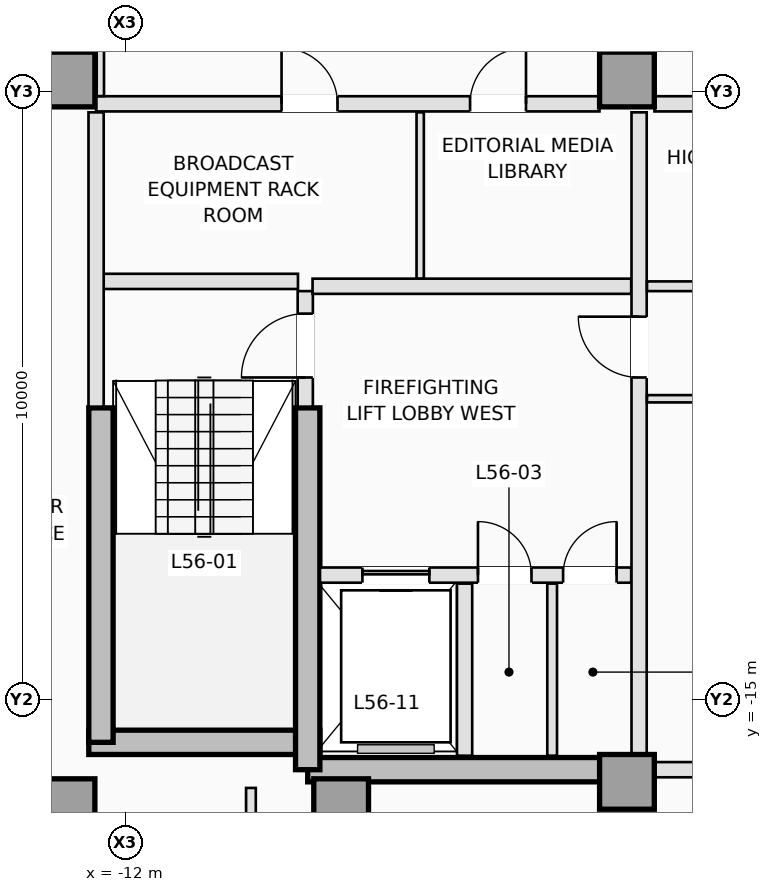
"""IFC4 building model, lengths in metres.
Left out: names, types, materials, properties, quantities, classifications, styles, units other than length and angle.
Written with IfcOpenShell. Run it as: python <this file> out.ifc"""

import sys

from ifc_helpers import new_model, si_unit, direction, frame, frame_2d, origin, origin_2d, place, context, subcontext, project, spatial, rectangle, extrude, element, fill, save


model = new_model("IFC4")
c1 = context("Model", 3, precision=1e-05, world=origin(), true_north=direction((0.0, 1.0)))
c2 = subcontext(c1, "Body", "Model", "MODEL_VIEW")
j1 = project(units=[si_unit("LENGTHUNIT", "METRE"), si_unit("PLANEANGLEUNIT", "RADIAN")], contexts=[c1])
p1 = place(None, origin())
s1 = spatial("IfcSite", under=j1, at=p1, CompositionType="ELEMENT")
p2 = place(p1, origin())
s2 = spatial("IfcBuilding", under=s1, at=p2, CompositionType="ELEMENT")
p3 = place(p2, frame((0.0, 0.0, 204.4)))
s3 = spatial("IfcBuildingStorey", under=s2, at=p3, CompositionType="ELEMENT", Elevation=204.4)
p4 = place(p3, frame((-12.6, -15.7, 0.0), z_axis=(0.0, 0.0, 1.0), x_axis=(1.0, 0.0, 0.0)))
e1 = element("IfcWall", 1, at=p4, inside=s3, PredefinedType="SHEAR", context=c2, shape_type="SweptSolid", body=[
    extrude(rectangle(XDim=3.8, YDim=0.4, at=frame_2d((1.9, 0.0))), origin(), (0.0, 0.0, 1.0), 3.5),
])
p5 = place(p3, frame((-9.0, -16.15, 0.0), z_axis=(0.0, 0.0, 1.0), x_axis=(1.0, 0.0, 0.0)))
e2 = element("IfcWall", 2, at=p5, inside=s3, PredefinedType="SHEAR", context=c2, shape_type="SweptSolid", body=[
    extrude(rectangle(XDim=5.25, YDim=0.4, at=frame_2d((2.625, 0.0))), origin(), (0.0, 0.0, 1.0), 3.5),
])
p6 = place(p3, frame((-12.4, -15.7, 0.0), z_axis=(0.0, 0.0, 1.0), x_axis=(0.0, 1.0, 0.0)))
e3 = element("IfcWall", 3, at=p6, inside=s3, PredefinedType="SHEAR", context=c2, shape_type="SweptSolid", body=[
    extrude(rectangle(XDim=5.5, YDim=0.4, at=frame_2d((2.75, 0.0))), origin(), (0.0, 0.0, 1.0), 3.5),
])
p7 = place(p3, frame((-9.0, -16.15, 0.0), z_axis=(0.0, 0.0, 1.0), x_axis=(0.0, 1.0, 0.0)))
e4 = element("IfcWall", 4, at=p7, inside=s3, PredefinedType="SHEAR", context=c2, shape_type="SweptSolid", body=[
    extrude(rectangle(XDim=5.95, YDim=0.4, at=frame_2d((2.975, 0.0))), origin(), (0.0, 0.0, 1.0), 3.5),
])
for number, where, z_axis, x_axis in (
    (5, (-12.95, -16.75, 0.0), (0.0, 0.0, 1.0), (1.0, 0.0, 0.0)),
    (6, (-8.45, -16.75, 0.0), (0.0, 0.0, 1.0), (1.0, 0.0, 0.0)),
    (7, (-3.75, -16.35, 0.0), (0.0, 0.0, 1.0), (1.0, 0.0, 0.0)),
    (8, (-12.95, -4.8, 0.0), (0.0, 0.0, 1.0), (1.0, 0.0, 0.0)),
    (9, (-3.75, -4.8, 0.0), (0.0, 0.0, 1.0), (1.0, 0.0, 0.0)),
):
    element("IfcColumn", number, at=place(p3, frame(where, z_axis=z_axis, x_axis=x_axis)), inside=s3, PredefinedType="COLUMN", context=c2, shape_type="SweptSolid", body=[
        extrude(rectangle(XDim=0.9, YDim=0.9, at=origin_2d()), origin(), (0.0, 0.0, 1.0), 3.5),
    ])
p8 = place(p3, frame((-9.04, -10.18, 0.0), z_axis=(0.0, 0.0, 1.0), x_axis=(0.0, 1.0, 0.0)))
e10 = element("IfcWall", 10, at=p8, inside=s3, PredefinedType="PARTITIONING", context=c2, shape_type="SweptSolid", body=[
    extrude(rectangle(XDim=1.9, YDim=0.25, at=frame_2d((0.95, 0.0))), origin(), (0.0, 0.0, 1.0), 3.25),
])
p9 = place(p8, frame((0.48, 0.0, 0.0)))
e11 = element("IfcOpeningElement", 11, at=p9, cuts=e10, PredefinedType="OPENING", context=c2, shape_type="SweptSolid", body=[
    extrude(rectangle(XDim=1.05, YDim=2.15, at=frame_2d((0.525, 1.075))), frame((0.0, 0.135, 0.0), z_axis=(0.0, -1.0, 0.0), x_axis=(1.0, 0.0, 0.0)), (0.0, 0.0, 1.0), 0.27),
])
p10 = place(p3, frame((-12.38, -8.12, 0.0), z_axis=(0.0, 0.0, 1.0), x_axis=(1.0, 0.0, 0.0)))
e12 = element("IfcWall", 12, at=p10, inside=s3, PredefinedType="PARTITIONING", context=c2, shape_type="SweptSolid", body=[
    extrude(rectangle(XDim=3.22, YDim=0.25, at=frame_2d((1.61, 0.0))), origin(), (0.0, 0.0, 1.0), 3.25),
])
p11 = place(p3, frame((-12.48, -10.18, 0.0), z_axis=(0.0, 0.0, 1.0), x_axis=(0.0, 1.0, 0.0)))
e13 = element("IfcWall", 13, at=p11, inside=s3, PredefinedType="PARTITIONING", context=c2, shape_type="SweptSolid", body=[
    extrude(rectangle(XDim=4.84, YDim=0.25, at=frame_2d((2.42, 0.0))), origin(), (0.0, 0.0, 1.0), 3.25),
])
p12 = place(p3, frame((-8.798, -12.95, 0.0), z_axis=(0.0, 0.0, 1.0), x_axis=(1.0, 0.0, 0.0)))
e14 = element("IfcWall", 14, at=p12, inside=s3, PredefinedType="PARTITIONING", context=c2, shape_type="SweptSolid", body=[
    extrude(rectangle(XDim=5.118, YDim=0.25, at=frame_2d((2.559, 0.0))), origin(), (0.0, 0.0, 1.0), 3.25),
])
p13 = place(p12, frame((0.698, 0.0, 0.0)))
e15 = element("IfcOpeningElement", 15, at=p13, cuts=e14, PredefinedType="OPENING", context=c2, shape_type="SweptSolid", body=[
    extrude(rectangle(XDim=1.1, YDim=2.15, at=frame_2d((0.55, 1.075))), frame((0.0, 0.135, 0.0), z_axis=(0.0, -1.0, 0.0), x_axis=(1.0, 0.0, 0.0)), (0.0, 0.0, 1.0), 0.27),
])
p14 = place(p12, frame((2.598, 0.0, 0.0)))
e16 = element("IfcOpeningElement", 16, at=p14, cuts=e14, PredefinedType="OPENING", context=c2, shape_type="SweptSolid", body=[
    extrude(rectangle(XDim=0.88, YDim=2.1, at=frame_2d((0.44, 1.05))), frame((0.0, 0.135, 0.0), z_axis=(0.0, -1.0, 0.0), x_axis=(1.0, 0.0, 0.0)), (0.0, 0.0, 1.0), 0.27),
])
p15 = place(p12, frame((3.998, 0.0, 0.0)))
e17 = element("IfcOpeningElement", 17, at=p15, cuts=e14, PredefinedType="OPENING", context=c2, shape_type="SweptSolid", body=[
    extrude(rectangle(XDim=0.88, YDim=2.1, at=frame_2d((0.44, 1.05))), frame((0.0, 0.135, 0.0), z_axis=(0.0, -1.0, 0.0), x_axis=(1.0, 0.0, 0.0)), (0.0, 0.0, 1.0), 0.27),
])
p16 = place(p3, frame((-6.42, -15.92, 0.0), z_axis=(0.0, 0.0, 1.0), x_axis=(0.0, 1.0, 0.0)))
e18 = element("IfcWall", 18, at=p16, inside=s3, PredefinedType="PARTITIONING", context=c2, shape_type="SweptSolid", body=[
    extrude(rectangle(XDim=2.83, YDim=0.25, at=frame_2d((1.415, 0.0))), origin(), (0.0, 0.0, 1.0), 3.25),
])
p17 = place(p3, frame((-4.98, -15.92, 0.0), z_axis=(0.0, 0.0, 1.0), x_axis=(0.0, 1.0, 0.0)))
e19 = element("IfcWall", 19, at=p17, inside=s3, PredefinedType="PARTITIONING", context=c2, shape_type="SweptSolid", body=[
    extrude(rectangle(XDim=2.83, YDim=0.16, at=frame_2d((1.415, 0.0))), origin(), (0.0, 0.0, 1.0), 3.25),
])
p18 = place(p3, frame((-8.92, -8.2, 0.0), z_axis=(0.0, 0.0, 1.0), x_axis=(1.0, 0.0, 0.0)))
e20 = element("IfcWall", 20, at=p18, inside=s3, PredefinedType="PARTITIONING", context=c2, shape_type="SweptSolid", body=[
    extrude(rectangle(XDim=5.24, YDim=0.25, at=frame_2d((2.62, 0.0))), origin(), (0.0, 0.0, 1.0), 3.25),
])
p19 = place(p3, frame((-3.55, -15.898, 0.0), z_axis=(0.0, 0.0, 1.0), x_axis=(0.0, 1.0, 0.0)))
e21 = element("IfcWall", 21, at=p19, inside=s3, PredefinedType="PARTITIONING", context=c2, shape_type="SweptSolid", body=[
    extrude(rectangle(XDim=10.558, YDim=0.25, at=frame_2d((5.279, 0.0))), origin(), (0.0, 0.0, 1.0), 3.25),
])
p20 = place(p19, frame((6.198, 0.0, 0.0)))
e22 = element("IfcOpeningElement", 22, at=p20, cuts=e21, PredefinedType="OPENING", context=c2, shape_type="SweptSolid", body=[
    extrude(rectangle(XDim=1.0, YDim=2.15, at=frame_2d((0.5, 1.075))), frame((0.0, 0.135, 0.0), z_axis=(0.0, -1.0, 0.0), x_axis=(1.0, 0.0, 0.0)), (0.0, 0.0, 1.0), 0.27),
])
p21 = place(p3, frame((-12.48, -5.2, 0.0), z_axis=(0.0, 0.0, 1.0), x_axis=(1.0, 0.0, 0.0)))
e23 = element("IfcWall", 23, at=p21, inside=s3, PredefinedType="PARTITIONING", context=c2, shape_type="SweptSolid", body=[
    extrude(rectangle(XDim=8.278, YDim=0.25, at=frame_2d((4.139, 0.0))), origin(), (0.0, 0.0, 1.0), 3.25),
])
p22 = place(p21, frame((3.05, 0.0, 0.0)))
e24 = element("IfcOpeningElement", 24, at=p22, cuts=e23, PredefinedType="OPENING", context=c2, shape_type="SweptSolid", body=[
    extrude(rectangle(XDim=0.92, YDim=2.12, at=frame_2d((0.46, 1.06))), frame((0.0, 0.135, 0.0), z_axis=(0.0, -1.0, 0.0), x_axis=(1.0, 0.0, 0.0)), (0.0, 0.0, 1.0), 0.27),
])
p23 = place(p21, frame((6.15, 0.0, 0.0)))
e25 = element("IfcOpeningElement", 25, at=p23, cuts=e23, PredefinedType="OPENING", context=c2, shape_type="SweptSolid", body=[
    extrude(rectangle(XDim=0.92, YDim=2.12, at=frame_2d((0.46, 1.06))), frame((0.0, 0.135, 0.0), z_axis=(0.0, -1.0, 0.0), x_axis=(1.0, 0.0, 0.0)), (0.0, 0.0, 1.0), 0.27),
])
p24 = place(p3, frame((-3.298, -5.2, 0.0), z_axis=(0.0, 0.0, 1.0), x_axis=(1.0, 0.0, 0.0)))
e26 = element("IfcWall", 26, at=p24, inside=s3, PredefinedType="PARTITIONING", context=c2, shape_type="SweptSolid", body=[
    extrude(rectangle(XDim=2.348, YDim=0.25, at=frame_2d((1.174, 0.0))), origin(), (0.0, 0.0, 1.0), 3.25),
])
p25 = place(p3, frame((-7.15, -8.073, 0.0), z_axis=(0.0, 0.0, 1.0), x_axis=(0.0, 1.0, 0.0)))
e27 = element("IfcWall", 27, at=p25, inside=s3, PredefinedType="PARTITIONING", context=c2, shape_type="SweptSolid", body=[
    extrude(rectangle(XDim=2.733, YDim=0.12, at=frame_2d((1.366, 0.0))), origin(), (0.0, 0.0, 1.0), 3.25),
])
p26 = place(p3, frame((-3.298, -16.15, 0.0), z_axis=(0.0, 0.0, 1.0), x_axis=(1.0, 0.0, 0.0)))
e28 = element("IfcWall", 28, at=p26, inside=s3, PredefinedType="PARTITIONING", context=c2, shape_type="SweptSolid", body=[
    extrude(rectangle(XDim=6.596, YDim=0.25, at=frame_2d((3.298, 0.0))), origin(), (0.0, 0.0, 1.0), 2.45),
])
p27 = place(p3, frame((-3.42, -8.2, 0.0), z_axis=(0.0, 0.0, 1.0), x_axis=(1.0, 0.0, 0.0)))
e29 = element("IfcWall", 29, at=p27, inside=s3, PredefinedType="PARTITIONING", context=c2, shape_type="SweptSolid", body=[
    extrude(rectangle(XDim=6.84, YDim=0.16, at=frame_2d((3.42, 0.0))), origin(), (0.0, 0.0, 1.0), 3.25),
])
p28 = place(p27, frame((2.92, 0.0, 0.0)))
e30 = element("IfcOpeningElement", 30, at=p28, cuts=e29, PredefinedType="OPENING", context=c2, shape_type="SweptSolid", body=[
    extrude(rectangle(XDim=1.0, YDim=2.15, at=frame_2d((0.5, 1.075))), frame((0.0, 0.09, 0.0), z_axis=(0.0, -1.0, 0.0), x_axis=(1.0, 0.0, 0.0)), (0.0, 0.0, 1.0), 0.18),
])
p29 = place(p3, frame((-3.42, -10.05, 0.0), z_axis=(0.0, 0.0, 1.0), x_axis=(1.0, 0.0, 0.0)))
e31 = element("IfcWall", 31, at=p29, inside=s3, PredefinedType="PARTITIONING", context=c2, shape_type="SweptSolid", body=[
    extrude(rectangle(XDim=6.84, YDim=0.12, at=frame_2d((3.42, 0.0))), origin(), (0.0, 0.0, 1.0), 3.25),
])
p30 = place(p29, frame((2.95, 0.0, 0.0)))
e32 = element("IfcOpeningElement", 32, at=p30, cuts=e31, PredefinedType="OPENING", context=c2, shape_type="SweptSolid", body=[
    extrude(rectangle(XDim=0.92, YDim=2.12, at=frame_2d((0.46, 1.06))), frame((0.0, 0.07, 0.0), z_axis=(0.0, -1.0, 0.0), x_axis=(1.0, 0.0, 0.0)), (0.0, 0.0, 1.0), 0.14),
])
p31 = place(p3, frame((-12.41, -5.073, 0.0), z_axis=(0.0, 0.0, 1.0), x_axis=(0.0, 1.0, 0.0)))
e33 = element("IfcWall", 33, at=p31, inside=s3, PredefinedType="PARTITIONING", context=c2, shape_type="SweptSolid", body=[
    extrude(rectangle(XDim=2.673, YDim=0.12, at=frame_2d((1.336, 0.0))), origin(), (0.0, 0.0, 1.0), 3.25),
])
p32 = place(p31, frame((0.828, 0.0, 0.0)))
e34 = element("IfcOpeningElement", 34, at=p32, cuts=e33, PredefinedType="OPENING", context=c2, shape_type="SweptSolid", body=[
    extrude(rectangle(XDim=0.92, YDim=2.12, at=frame_2d((0.46, 1.06))), frame((0.0, 0.07, 0.0), z_axis=(0.0, -1.0, 0.0), x_axis=(1.0, 0.0, 0.0)), (0.0, 0.0, 1.0), 0.14),
])
p33 = place(p3, frame((-9.934, -16.45, 0.0), z_axis=(0.0, 0.0, 1.0), x_axis=(0.0, -1.0, 0.0)))
e35 = element("IfcWall", 35, at=p33, inside=s3, PredefinedType="PARTITIONING", context=c2, shape_type="SweptSolid", body=[
    extrude(rectangle(XDim=1.193, YDim=0.16, at=frame_2d((0.597, 0.0))), origin(), (0.0, 0.0, 1.0), 3.25),
])
p34 = place(p13, origin())
e36 = element("IfcDoor", 36, at=p34, inside=s3, OperationType="SLIDING_TO_LEFT", PredefinedType="DOOR", context=c2, shape_type="SweptSolid", body=[
    extrude(rectangle(XDim=1.1, YDim=2.15, at=frame_2d((0.55, 1.075))), frame((0.0, 0.025, 0.0), z_axis=(0.0, -1.0, 0.0), x_axis=(1.0, 0.0, 0.0)), (0.0, 0.0, 1.0), 0.05),
])
fill(e15, e36)
p35 = place(p9, origin())
e37 = element("IfcDoor", 37, at=p35, inside=s3, OperationType="SINGLE_SWING_LEFT", PredefinedType="DOOR", context=c2, shape_type="SweptSolid", body=[
    extrude(rectangle(XDim=1.05, YDim=2.15, at=frame_2d((0.525, 1.075))), frame((0.0, 0.025, 0.0), z_axis=(0.0, -1.0, 0.0), x_axis=(1.0, 0.0, 0.0)), (0.0, 0.0, 1.0), 0.05),
])
fill(e11, e37)
p36 = place(p14, origin())
e38 = element("IfcDoor", 38, at=p36, inside=s3, OperationType="SINGLE_SWING_LEFT", PredefinedType="TRAPDOOR", context=c2, shape_type="SweptSolid", body=[
    extrude(rectangle(XDim=0.88, YDim=2.1, at=frame_2d((0.44, 1.05))), frame((0.0, 0.025, 0.0), z_axis=(0.0, -1.0, 0.0), x_axis=(1.0, 0.0, 0.0)), (0.0, 0.0, 1.0), 0.05),
])
fill(e16, e38)
p37 = place(p15, origin())
e39 = element("IfcDoor", 39, at=p37, inside=s3, OperationType="SINGLE_SWING_RIGHT", PredefinedType="TRAPDOOR", context=c2, shape_type="SweptSolid", body=[
    extrude(rectangle(XDim=0.88, YDim=2.1, at=frame_2d((0.44, 1.05))), frame((0.0, 0.025, 0.0), z_axis=(0.0, -1.0, 0.0), x_axis=(1.0, 0.0, 0.0)), (0.0, 0.0, 1.0), 0.05),
])
fill(e17, e39)
p38 = place(p20, origin())
e40 = element("IfcDoor", 40, at=p38, inside=s3, OperationType="SINGLE_SWING_RIGHT", PredefinedType="DOOR", context=c2, shape_type="SweptSolid", body=[
    extrude(rectangle(XDim=1.0, YDim=2.15, at=frame_2d((0.5, 1.075))), frame((0.0, 0.025, 0.0), z_axis=(0.0, -1.0, 0.0), x_axis=(1.0, 0.0, 0.0)), (0.0, 0.0, 1.0), 0.05),
])
fill(e22, e40)
p39 = place(p22, origin())
e41 = element("IfcDoor", 41, at=p39, inside=s3, OperationType="SINGLE_SWING_LEFT", PredefinedType="DOOR", context=c2, shape_type="SweptSolid", body=[
    extrude(rectangle(XDim=0.92, YDim=2.12, at=frame_2d((0.46, 1.06))), frame((0.0, 0.025, 0.0), z_axis=(0.0, -1.0, 0.0), x_axis=(1.0, 0.0, 0.0)), (0.0, 0.0, 1.0), 0.05),
])
fill(e24, e41)
p40 = place(p23, origin())
e42 = element("IfcDoor", 42, at=p40, inside=s3, OperationType="SINGLE_SWING_RIGHT", PredefinedType="DOOR", context=c2, shape_type="SweptSolid", body=[
    extrude(rectangle(XDim=0.92, YDim=2.12, at=frame_2d((0.46, 1.06))), frame((0.0, 0.025, 0.0), z_axis=(0.0, -1.0, 0.0), x_axis=(1.0, 0.0, 0.0)), (0.0, 0.0, 1.0), 0.05),
])
fill(e25, e42)
save(model, sys.argv[1])
